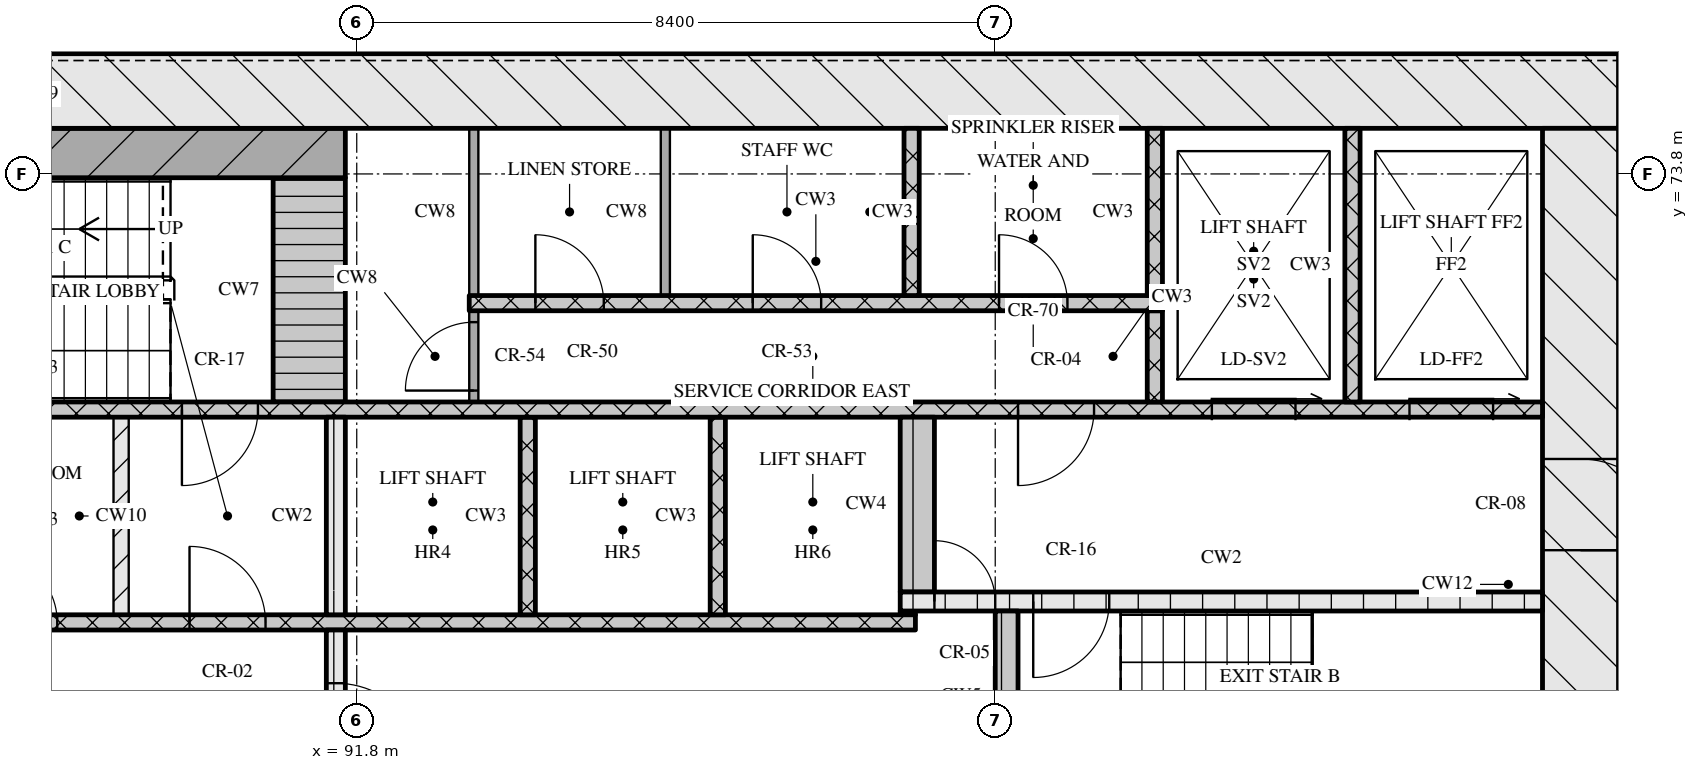
"""IFC4 building model, lengths in metres.
Left out: names, types, materials, properties, quantities, classifications, styles, units other than length and angle.
Written with IfcOpenShell. Run it as: python <this file> out.ifc"""

import sys

from ifc_helpers import new_model, si_unit, direction, frame, frame_2d, origin, place, context, subcontext, project, spatial, rectangle, extrude, element, fill, save


model = new_model("IFC4")
c1 = context("Model", 3, precision=1e-05, world=origin(), true_north=direction((0.0, 1.0)))
c2 = subcontext(c1, "Body", "Model", "MODEL_VIEW")
j1 = project(units=[si_unit("LENGTHUNIT", "METRE"), si_unit("PLANEANGLEUNIT", "RADIAN")], contexts=[c1])
p1 = place(None, origin())
s1 = spatial("IfcSite", under=j1, at=p1, CompositionType="ELEMENT")
p2 = place(p1, origin())
s2 = spatial("IfcBuilding", under=s1, at=p2, CompositionType="ELEMENT")
p3 = place(p2, frame((0.0, 0.0, 102.45)))
s3 = spatial("IfcBuildingStorey", under=s2, at=p3, CompositionType="ELEMENT", Elevation=102.45)
p4 = place(p3, frame((66.8, 74.9, 0.0), z_axis=(0.0, 0.0, 1.0), x_axis=(1.0, 0.0, 0.0)))
e1 = element("IfcWall", 1, at=p4, inside=s3, PredefinedType="SOLIDWALL", context=c2, shape_type="SweptSolid", body=[
    extrude(rectangle(XDim=41.6, YDim=1.0, at=frame_2d((20.8, 0.0))), origin(), (0.0, 0.0, 1.0), 3.32),
])
p5 = place(p3, frame((107.9, 62.4, 0.0), z_axis=(0.0, 0.0, 1.0), x_axis=(0.0, 1.0, 0.0)))
e2 = element("IfcWall", 2, at=p5, inside=s3, PredefinedType="SOLIDWALL", context=c2, shape_type="SweptSolid", body=[
    extrude(rectangle(XDim=12.0, YDim=1.0, at=frame_2d((6.0, 0.0))), origin(), (0.0, 0.0, 1.0), 3.32),
])
p6 = place(p5, frame((6.45, 0.0, 0.0)))
e3 = element("IfcOpeningElement", 3, at=p6, cuts=e2, PredefinedType="OPENING", context=c2, shape_type="SweptSolid", body=[
    extrude(rectangle(XDim=1.2, YDim=2.1, at=frame_2d((0.6, 1.05))), frame((0.0, 0.51, 0.0), z_axis=(0.0, -1.0, 0.0), x_axis=(1.0, 0.0, 0.0)), (0.0, 0.0, 1.0), 1.02),
])
p7 = place(p3, frame((91.525, 65.2, 0.0), z_axis=(0.0, 0.0, 1.0), x_axis=(0.0, 1.0, 0.0)))
e4 = element("IfcWall", 4, at=p7, inside=s3, PredefinedType="SOLIDWALL", context=c2, shape_type="SweptSolid", body=[
    extrude(rectangle(XDim=2.6, YDim=0.25, at=frame_2d((1.3, 0.0))), origin(), (0.0, 0.0, 1.0), 3.32),
])
p8 = place(p7, frame((0.7, 0.0, 0.0)))
e5 = element("IfcOpeningElement", 5, at=p8, cuts=e4, PredefinedType="OPENING", context=c2, shape_type="SweptSolid", body=[
    extrude(rectangle(XDim=1.2, YDim=2.1, at=frame_2d((0.6, 1.05))), frame((0.0, 0.135, 0.0), z_axis=(0.0, -1.0, 0.0), x_axis=(1.0, 0.0, 0.0)), (0.0, 0.0, 1.0), 0.27),
])
p9 = place(p3, frame((100.35, 65.2, 0.0), z_axis=(0.0, 0.0, 1.0), x_axis=(0.0, 1.0, 0.0)))
e6 = element("IfcWall", 6, at=p9, inside=s3, PredefinedType="SOLIDWALL", context=c2, shape_type="SweptSolid", body=[
    extrude(rectangle(XDim=2.85, YDim=0.3, at=frame_2d((1.425, 0.0))), origin(), (0.0, 0.0, 1.0), 3.32),
])
p10 = place(p3, frame((76.05, 67.9, 0.0), z_axis=(0.0, 0.0, 1.0), x_axis=(1.0, 0.0, 0.0)))
e7 = element("IfcWall", 7, at=p10, inside=s3, PredefinedType="SOLIDWALL", context=c2, shape_type="SweptSolid", body=[
    extrude(rectangle(XDim=23.1, YDim=0.2, at=frame_2d((11.55, 0.0))), origin(), (0.0, 0.0, 1.0), 3.32),
])
p11 = place(p10, frame((0.6, 0.0, 0.0)))
e8 = element("IfcOpeningElement", 8, at=p11, cuts=e7, PredefinedType="OPENING", context=c2, shape_type="SweptSolid", body=[
    extrude(rectangle(XDim=1.1, YDim=2.1, at=frame_2d((0.55, 1.05))), frame((0.0, 0.11, 0.0), z_axis=(0.0, -1.0, 0.0), x_axis=(1.0, 0.0, 0.0)), (0.0, 0.0, 1.0), 0.22),
])
p12 = place(p10, frame((3.1, 0.0, 0.0)))
e9 = element("IfcOpeningElement", 9, at=p12, cuts=e7, PredefinedType="OPENING", context=c2, shape_type="SweptSolid", body=[
    extrude(rectangle(XDim=1.1, YDim=2.1, at=frame_2d((0.55, 1.05))), frame((0.0, 0.11, 0.0), z_axis=(0.0, -1.0, 0.0), x_axis=(1.0, 0.0, 0.0)), (0.0, 0.0, 1.0), 0.22),
])
p13 = place(p10, frame((5.6, 0.0, 0.0)))
e10 = element("IfcOpeningElement", 10, at=p13, cuts=e7, PredefinedType="OPENING", context=c2, shape_type="SweptSolid", body=[
    extrude(rectangle(XDim=1.1, YDim=2.1, at=frame_2d((0.55, 1.05))), frame((0.0, 0.11, 0.0), z_axis=(0.0, -1.0, 0.0), x_axis=(1.0, 0.0, 0.0)), (0.0, 0.0, 1.0), 0.22),
])
p14 = place(p10, frame((8.45, 0.0, 0.0)))
e11 = element("IfcOpeningElement", 11, at=p14, cuts=e7, PredefinedType="OPENING", context=c2, shape_type="SweptSolid", body=[
    extrude(rectangle(XDim=0.9, YDim=2.1, at=frame_2d((0.45, 1.05))), frame((0.0, 0.11, 0.0), z_axis=(0.0, -1.0, 0.0), x_axis=(1.0, 0.0, 0.0)), (0.0, 0.0, 1.0), 0.22),
])
p15 = place(p10, frame((10.91, 0.0, 0.0)))
e12 = element("IfcOpeningElement", 12, at=p15, cuts=e7, PredefinedType="OPENING", context=c2, shape_type="SweptSolid", body=[
    extrude(rectangle(XDim=0.9, YDim=2.1, at=frame_2d((0.45, 1.05))), frame((0.0, 0.11, 0.0), z_axis=(0.0, -1.0, 0.0), x_axis=(1.0, 0.0, 0.0)), (0.0, 0.0, 1.0), 0.22),
])
p16 = place(p10, frame((13.55, 0.0, 0.0)))
e13 = element("IfcOpeningElement", 13, at=p16, cuts=e7, PredefinedType="OPENING", context=c2, shape_type="SweptSolid", body=[
    extrude(rectangle(XDim=1.0, YDim=2.1, at=frame_2d((0.5, 1.05))), frame((0.0, 0.11, 0.0), z_axis=(0.0, -1.0, 0.0), x_axis=(1.0, 0.0, 0.0)), (0.0, 0.0, 1.0), 0.22),
])
p17 = place(p3, frame((88.7, 68.0, 0.0), z_axis=(0.0, 0.0, 1.0), x_axis=(0.0, 1.0, 0.0)))
e14 = element("IfcWall", 14, at=p17, inside=s3, PredefinedType="PARTITIONING", context=c2, shape_type="SweptSolid", body=[
    extrude(rectangle(XDim=2.6, YDim=0.2, at=frame_2d((1.3, 0.0))), origin(), (0.0, 0.0, 1.0), 3.32),
])
p18 = place(p3, frame((91.525, 68.0, 0.0), z_axis=(0.0, 0.0, 1.0), x_axis=(0.0, 1.0, 0.0)))
e15 = element("IfcWall", 15, at=p18, inside=s3, PredefinedType="SOLIDWALL", context=c2, shape_type="SweptSolid", body=[
    extrude(rectangle(XDim=2.6, YDim=0.25, at=frame_2d((1.3, 0.0))), origin(), (0.0, 0.0, 1.0), 3.32),
])
for number, where, z_axis, x_axis in (
    (16, (94.05, 68.0, 0.0), (0.0, 0.0, 1.0), (0.0, 1.0, 0.0)),
    (17, (96.55, 68.0, 0.0), (0.0, 0.0, 1.0), (0.0, 1.0, 0.0)),
):
    element("IfcWall", number, at=place(p3, frame(where, z_axis=z_axis, x_axis=x_axis)), inside=s3, PredefinedType="SOLIDWALL", context=c2, shape_type="SweptSolid", body=[
        extrude(rectangle(XDim=2.6, YDim=0.2, at=frame_2d((1.3, 0.0))), origin(), (0.0, 0.0, 1.0), 3.32),
    ])
p19 = place(p3, frame((98.95, 68.025, 0.0), z_axis=(0.0, 0.0, 1.0), x_axis=(1.0, 0.0, 0.0)))
e18 = element("IfcWall", 18, at=p19, inside=s3, PredefinedType="SOLIDWALL", context=c2, shape_type="SweptSolid", body=[
    extrude(rectangle(XDim=0.2, YDim=0.05, at=frame_2d((0.1, 0.0))), origin(), (0.0, 0.0, 1.0), 3.32),
])
p20 = place(p3, frame((98.95, 68.175, 0.0), z_axis=(0.0, 0.0, 1.0), x_axis=(1.0, 0.0, 0.0)))
e19 = element("IfcWall", 19, at=p20, inside=s3, PredefinedType="SOLIDWALL", context=c2, shape_type="SweptSolid", body=[
    extrude(rectangle(XDim=8.45, YDim=0.25, at=frame_2d((4.225, 0.0))), origin(), (0.0, 0.0, 1.0), 3.32),
])
p21 = place(p20, frame((0.45, 0.0, 0.0)))
e20 = element("IfcOpeningElement", 20, at=p21, cuts=e19, PredefinedType="OPENING", context=c2, shape_type="SweptSolid", body=[
    extrude(rectangle(XDim=0.8, YDim=2.1, at=frame_2d((0.4, 1.05))), frame((0.0, 0.135, 0.0), z_axis=(0.0, -1.0, 0.0), x_axis=(1.0, 0.0, 0.0)), (0.0, 0.0, 1.0), 0.27),
])
p22 = place(p20, frame((1.75, 0.0, 0.0)))
e21 = element("IfcOpeningElement", 21, at=p22, cuts=e19, PredefinedType="OPENING", context=c2, shape_type="SweptSolid", body=[
    extrude(rectangle(XDim=1.0, YDim=2.1, at=frame_2d((0.5, 1.05))), frame((0.0, 0.135, 0.0), z_axis=(0.0, -1.0, 0.0), x_axis=(1.0, 0.0, 0.0)), (0.0, 0.0, 1.0), 0.27),
])
p23 = place(p3, frame((99.175, 68.3, 0.0), z_axis=(0.0, 0.0, 1.0), x_axis=(0.0, 1.0, 0.0)))
e22 = element("IfcWall", 22, at=p23, inside=s3, PredefinedType="SOLIDWALL", context=c2, shape_type="SweptSolid", body=[
    extrude(rectangle(XDim=2.3, YDim=0.45, at=frame_2d((1.15, 0.0))), origin(), (0.0, 0.0, 1.0), 3.32),
])
p24 = place(p3, frame((67.8, 70.7, 0.0), z_axis=(0.0, 0.0, 1.0), x_axis=(1.0, 0.0, 0.0)))
e23 = element("IfcWall", 23, at=p24, inside=s3, PredefinedType="SOLIDWALL", context=c2, shape_type="SweptSolid", body=[
    extrude(rectangle(XDim=39.6, YDim=0.2, at=frame_2d((19.8, 0.0))), origin(), (0.0, 0.0, 1.0), 3.32),
])
p25 = place(p24, frame((0.65, 0.0, 0.0)))
e24 = element("IfcOpeningElement", 24, at=p25, cuts=e23, PredefinedType="OPENING", context=c2, shape_type="SweptSolid", body=[
    extrude(rectangle(XDim=1.1, YDim=2.1, at=frame_2d((0.55, 1.05))), frame((0.0, 0.11, 0.0), z_axis=(0.0, -1.0, 0.0), x_axis=(1.0, 0.0, 0.0)), (0.0, 0.0, 1.0), 0.22),
])
p26 = place(p24, frame((3.25, 0.0, 0.0)))
e25 = element("IfcOpeningElement", 25, at=p26, cuts=e23, PredefinedType="OPENING", context=c2, shape_type="SweptSolid", body=[
    extrude(rectangle(XDim=1.1, YDim=2.1, at=frame_2d((0.55, 1.05))), frame((0.0, 0.11, 0.0), z_axis=(0.0, -1.0, 0.0), x_axis=(1.0, 0.0, 0.0)), (0.0, 0.0, 1.0), 0.22),
])
p27 = place(p24, frame((5.9, 0.0, 0.0)))
e26 = element("IfcOpeningElement", 26, at=p27, cuts=e23, PredefinedType="OPENING", context=c2, shape_type="SweptSolid", body=[
    extrude(rectangle(XDim=1.0, YDim=2.1, at=frame_2d((0.5, 1.05))), frame((0.0, 0.11, 0.0), z_axis=(0.0, -1.0, 0.0), x_axis=(1.0, 0.0, 0.0)), (0.0, 0.0, 1.0), 0.22),
])
p28 = place(p24, frame((21.7, 0.0, 0.0)))
e27 = element("IfcOpeningElement", 27, at=p28, cuts=e23, PredefinedType="OPENING", context=c2, shape_type="SweptSolid", body=[
    extrude(rectangle(XDim=1.0, YDim=2.1, at=frame_2d((0.5, 1.05))), frame((0.0, 0.11, 0.0), z_axis=(0.0, -1.0, 0.0), x_axis=(1.0, 0.0, 0.0)), (0.0, 0.0, 1.0), 0.22),
])
p29 = place(p24, frame((32.7, 0.0, 0.0)))
e28 = element("IfcOpeningElement", 28, at=p29, cuts=e23, PredefinedType="OPENING", context=c2, shape_type="SweptSolid", body=[
    extrude(rectangle(XDim=1.0, YDim=2.1, at=frame_2d((0.5, 1.05))), frame((0.0, 0.11, 0.0), z_axis=(0.0, -1.0, 0.0), x_axis=(1.0, 0.0, 0.0)), (0.0, 0.0, 1.0), 0.22),
])
p30 = place(p24, frame((35.25, 0.0, 0.0)))
e29 = element("IfcOpeningElement", 29, at=p30, cuts=e23, PredefinedType="OPENING", context=c2, shape_type="SweptSolid", body=[
    extrude(rectangle(XDim=1.1, YDim=2.1, at=frame_2d((0.55, 1.05))), frame((0.0, 0.11, 0.0), z_axis=(0.0, -1.0, 0.0), x_axis=(1.0, 0.0, 0.0)), (0.0, 0.0, 1.0), 0.22),
])
p31 = place(p24, frame((37.85, 0.0, 0.0)))
e30 = element("IfcOpeningElement", 30, at=p31, cuts=e23, PredefinedType="OPENING", context=c2, shape_type="SweptSolid", body=[
    extrude(rectangle(XDim=1.1, YDim=2.1, at=frame_2d((0.55, 1.05))), frame((0.0, 0.11, 0.0), z_axis=(0.0, -1.0, 0.0), x_axis=(1.0, 0.0, 0.0)), (0.0, 0.0, 1.0), 0.22),
])
p32 = place(p3, frame((91.175, 70.8, 0.0), z_axis=(0.0, 0.0, 1.0), x_axis=(0.0, 1.0, 0.0)))
e31 = element("IfcWall", 31, at=p32, inside=s3, PredefinedType="SOLIDWALL", context=c2, shape_type="SweptSolid", body=[
    extrude(rectangle(XDim=2.95, YDim=0.95, at=frame_2d((1.475, 0.0))), origin(), (0.0, 0.0, 1.0), 3.32),
])
p33 = place(p3, frame((93.34, 70.8, 0.0), z_axis=(0.0, 0.0, 1.0), x_axis=(0.0, 1.0, 0.0)))
e32 = element("IfcWall", 32, at=p33, inside=s3, PredefinedType="PARTITIONING", context=c2, shape_type="SweptSolid", body=[
    extrude(rectangle(XDim=1.2, YDim=0.12, at=frame_2d((0.6, 0.0))), origin(), (0.0, 0.0, 1.0), 3.32),
])
p34 = place(p33, frame((0.15, 0.0, 0.0)))
e33 = element("IfcOpeningElement", 33, at=p34, cuts=e32, PredefinedType="OPENING", context=c2, shape_type="SweptSolid", body=[
    extrude(rectangle(XDim=0.9, YDim=2.1, at=frame_2d((0.45, 1.05))), frame((0.0, 0.07, 0.0), z_axis=(0.0, -1.0, 0.0), x_axis=(1.0, 0.0, 0.0)), (0.0, 0.0, 1.0), 0.14),
])
p35 = place(p3, frame((102.3, 70.8, 0.0), z_axis=(0.0, 0.0, 1.0), x_axis=(0.0, 1.0, 0.0)))
e34 = element("IfcWall", 34, at=p35, inside=s3, PredefinedType="SOLIDWALL", context=c2, shape_type="SweptSolid", body=[
    extrude(rectangle(XDim=1.2, YDim=0.2, at=frame_2d((0.6, 0.0))), origin(), (0.0, 0.0, 1.0), 3.32),
])
p36 = place(p3, frame((104.9, 70.8, 0.0), z_axis=(0.0, 0.0, 1.0), x_axis=(0.0, 1.0, 0.0)))
e35 = element("IfcWall", 35, at=p36, inside=s3, PredefinedType="SOLIDWALL", context=c2, shape_type="SweptSolid", body=[
    extrude(rectangle(XDim=3.6, YDim=0.2, at=frame_2d((1.8, 0.0))), origin(), (0.0, 0.0, 1.0), 3.32),
])
p37 = place(p3, frame((93.28, 72.1, 0.0), z_axis=(0.0, 0.0, 1.0), x_axis=(1.0, 0.0, 0.0)))
e36 = element("IfcWall", 36, at=p37, inside=s3, PredefinedType="SOLIDWALL", context=c2, shape_type="SweptSolid", body=[
    extrude(rectangle(XDim=9.12, YDim=0.2, at=frame_2d((4.56, 0.0))), origin(), (0.0, 0.0, 1.0), 3.32),
])
p38 = place(p37, frame((0.87, 0.0, 0.0)))
e37 = element("IfcOpeningElement", 37, at=p38, cuts=e36, PredefinedType="OPENING", context=c2, shape_type="SweptSolid", body=[
    extrude(rectangle(XDim=0.9, YDim=2.1, at=frame_2d((0.45, 1.05))), frame((0.0, 0.11, 0.0), z_axis=(0.0, -1.0, 0.0), x_axis=(1.0, 0.0, 0.0)), (0.0, 0.0, 1.0), 0.22),
])
p39 = place(p37, frame((3.73, 0.0, 0.0)))
e38 = element("IfcOpeningElement", 38, at=p39, cuts=e36, PredefinedType="OPENING", context=c2, shape_type="SweptSolid", body=[
    extrude(rectangle(XDim=0.9, YDim=2.1, at=frame_2d((0.45, 1.05))), frame((0.0, 0.11, 0.0), z_axis=(0.0, -1.0, 0.0), x_axis=(1.0, 0.0, 0.0)), (0.0, 0.0, 1.0), 0.22),
])
p40 = place(p37, frame((6.97, 0.0, 0.0)))
e39 = element("IfcOpeningElement", 39, at=p40, cuts=e36, PredefinedType="OPENING", context=c2, shape_type="SweptSolid", body=[
    extrude(rectangle(XDim=0.9, YDim=2.1, at=frame_2d((0.45, 1.05))), frame((0.0, 0.11, 0.0), z_axis=(0.0, -1.0, 0.0), x_axis=(1.0, 0.0, 0.0)), (0.0, 0.0, 1.0), 0.22),
])
for number, where, z_axis, x_axis in (
    (40, (93.34, 72.2, 0.0), (0.0, 0.0, 1.0), (0.0, 1.0, 0.0)),
    (41, (95.86, 72.2, 0.0), (0.0, 0.0, 1.0), (0.0, 1.0, 0.0)),
):
    element("IfcWall", number, at=place(p3, frame(where, z_axis=z_axis, x_axis=x_axis)), inside=s3, PredefinedType="PARTITIONING", context=c2, shape_type="SweptSolid", body=[
        extrude(rectangle(XDim=2.2, YDim=0.12, at=frame_2d((1.1, 0.0))), origin(), (0.0, 0.0, 1.0), 3.32),
    ])
for number, where, z_axis, x_axis in (
    (42, (99.1, 72.2, 0.0), (0.0, 0.0, 1.0), (0.0, 1.0, 0.0)),
    (43, (102.3, 72.2, 0.0), (0.0, 0.0, 1.0), (0.0, 1.0, 0.0)),
):
    element("IfcWall", number, at=place(p3, frame(where, z_axis=z_axis, x_axis=x_axis)), inside=s3, PredefinedType="SOLIDWALL", context=c2, shape_type="SweptSolid", body=[
        extrude(rectangle(XDim=2.2, YDim=0.2, at=frame_2d((1.1, 0.0))), origin(), (0.0, 0.0, 1.0), 3.32),
    ])
p41 = place(p3, frame((83.55, 74.075, 0.0), z_axis=(0.0, 0.0, 1.0), x_axis=(1.0, 0.0, 0.0)))
e44 = element("IfcWall", 44, at=p41, inside=s3, PredefinedType="SOLIDWALL", context=c2, shape_type="SweptSolid", body=[
    extrude(rectangle(XDim=8.1, YDim=0.65, at=frame_2d((4.05, 0.0))), origin(), (0.0, 0.0, 1.0), 3.32),
])
p42 = place(p8, origin())
e45 = element("IfcDoor", 45, at=p42, inside=s3, OperationType="SINGLE_SWING_RIGHT", PredefinedType="DOOR", context=c2, shape_type="SweptSolid", body=[
    extrude(rectangle(XDim=1.2, YDim=2.1, at=frame_2d((0.6, 1.05))), frame((0.0, 0.025, 0.0), z_axis=(0.0, -1.0, 0.0), x_axis=(1.0, 0.0, 0.0)), (0.0, 0.0, 1.0), 0.05),
])
fill(e5, e45)
p43 = place(p15, origin())
e46 = element("IfcDoor", 46, at=p43, inside=s3, OperationType="SINGLE_SWING_LEFT", PredefinedType="DOOR", context=c2, shape_type="SweptSolid", body=[
    extrude(rectangle(XDim=0.9, YDim=2.1, at=frame_2d((0.45, 1.05))), frame((0.0, 0.025, 0.0), z_axis=(0.0, -1.0, 0.0), x_axis=(1.0, 0.0, 0.0)), (0.0, 0.0, 1.0), 0.05),
])
fill(e12, e46)
p44 = place(p16, origin())
e47 = element("IfcDoor", 47, at=p44, inside=s3, OperationType="SINGLE_SWING_LEFT", PredefinedType="DOOR", context=c2, shape_type="SweptSolid", body=[
    extrude(rectangle(XDim=1.0, YDim=2.1, at=frame_2d((0.5, 1.05))), frame((0.0, 0.025, 0.0), z_axis=(0.0, -1.0, 0.0), x_axis=(1.0, 0.0, 0.0)), (0.0, 0.0, 1.0), 0.05),
])
fill(e13, e47)
p45 = place(p21, origin())
e48 = element("IfcDoor", 48, at=p45, inside=s3, OperationType="SINGLE_SWING_LEFT", PredefinedType="DOOR", context=c2, shape_type="SweptSolid", body=[
    extrude(rectangle(XDim=0.8, YDim=2.1, at=frame_2d((0.4, 1.05))), frame((0.0, 0.025, 0.0), z_axis=(0.0, -1.0, 0.0), x_axis=(1.0, 0.0, 0.0)), (0.0, 0.0, 1.0), 0.05),
])
fill(e20, e48)
p46 = place(p22, origin())
e49 = element("IfcDoor", 49, at=p46, inside=s3, OperationType="SINGLE_SWING_RIGHT", PredefinedType="DOOR", context=c2, shape_type="SweptSolid", body=[
    extrude(rectangle(XDim=1.0, YDim=2.1, at=frame_2d((0.5, 1.05))), frame((0.0, 0.025, 0.0), z_axis=(0.0, -1.0, 0.0), x_axis=(1.0, 0.0, 0.0)), (0.0, 0.0, 1.0), 0.05),
])
fill(e21, e49)
p47 = place(p6, origin())
e50 = element("IfcDoor", 50, at=p47, inside=s3, OperationType="SINGLE_SWING_RIGHT", PredefinedType="DOOR", context=c2, shape_type="SweptSolid", body=[
    extrude(rectangle(XDim=1.2, YDim=2.1, at=frame_2d((0.6, 1.05))), frame((0.0, 0.025, 0.0), z_axis=(0.0, -1.0, 0.0), x_axis=(1.0, 0.0, 0.0)), (0.0, 0.0, 1.0), 0.05),
])
fill(e3, e50)
p48 = place(p28, origin())
e51 = element("IfcDoor", 51, at=p48, inside=s3, OperationType="SINGLE_SWING_RIGHT", PredefinedType="DOOR", context=c2, shape_type="SweptSolid", body=[
    extrude(rectangle(XDim=1.0, YDim=2.1, at=frame_2d((0.5, 1.05))), frame((0.0, 0.025, 0.0), z_axis=(0.0, -1.0, 0.0), x_axis=(1.0, 0.0, 0.0)), (0.0, 0.0, 1.0), 0.05),
])
fill(e27, e51)
p49 = place(p29, origin())
e52 = element("IfcDoor", 52, at=p49, inside=s3, OperationType="SINGLE_SWING_RIGHT", PredefinedType="DOOR", context=c2, shape_type="SweptSolid", body=[
    extrude(rectangle(XDim=1.0, YDim=2.1, at=frame_2d((0.5, 1.05))), frame((0.0, 0.025, 0.0), z_axis=(0.0, -1.0, 0.0), x_axis=(1.0, 0.0, 0.0)), (0.0, 0.0, 1.0), 0.05),
])
fill(e28, e52)
p50 = place(p30, origin())
e53 = element("IfcDoor", 53, at=p50, inside=s3, OperationType="SLIDING_TO_RIGHT", PredefinedType="DOOR", context=c2, shape_type="SweptSolid", body=[
    extrude(rectangle(XDim=1.1, YDim=2.1, at=frame_2d((0.55, 1.05))), frame((0.0, 0.025, 0.0), z_axis=(0.0, -1.0, 0.0), x_axis=(1.0, 0.0, 0.0)), (0.0, 0.0, 1.0), 0.05),
])
fill(e29, e53)
p51 = place(p31, origin())
e54 = element("IfcDoor", 54, at=p51, inside=s3, OperationType="SLIDING_TO_RIGHT", PredefinedType="DOOR", context=c2, shape_type="SweptSolid", body=[
    extrude(rectangle(XDim=1.1, YDim=2.1, at=frame_2d((0.55, 1.05))), frame((0.0, 0.025, 0.0), z_axis=(0.0, -1.0, 0.0), x_axis=(1.0, 0.0, 0.0)), (0.0, 0.0, 1.0), 0.05),
])
fill(e30, e54)
p52 = place(p34, origin())
e55 = element("IfcDoor", 55, at=p52, inside=s3, OperationType="SINGLE_SWING_LEFT", PredefinedType="DOOR", context=c2, shape_type="SweptSolid", body=[
    extrude(rectangle(XDim=0.9, YDim=2.1, at=frame_2d((0.45, 1.05))), frame((0.0, 0.025, 0.0), z_axis=(0.0, -1.0, 0.0), x_axis=(1.0, 0.0, 0.0)), (0.0, 0.0, 1.0), 0.05),
])
fill(e33, e55)
p53 = place(p38, origin())
e56 = element("IfcDoor", 56, at=p53, inside=s3, OperationType="SINGLE_SWING_LEFT", PredefinedType="DOOR", context=c2, shape_type="SweptSolid", body=[
    extrude(rectangle(XDim=0.9, YDim=2.1, at=frame_2d((0.45, 1.05))), frame((0.0, 0.025, 0.0), z_axis=(0.0, -1.0, 0.0), x_axis=(1.0, 0.0, 0.0)), (0.0, 0.0, 1.0), 0.05),
])
fill(e37, e56)
p54 = place(p39, origin())
e57 = element("IfcDoor", 57, at=p54, inside=s3, OperationType="SINGLE_SWING_LEFT", PredefinedType="DOOR", context=c2, shape_type="SweptSolid", body=[
    extrude(rectangle(XDim=0.9, YDim=2.1, at=frame_2d((0.45, 1.05))), frame((0.0, 0.025, 0.0), z_axis=(0.0, -1.0, 0.0), x_axis=(1.0, 0.0, 0.0)), (0.0, 0.0, 1.0), 0.05),
])
fill(e38, e57)
p55 = place(p40, origin())
e58 = element("IfcDoor", 58, at=p55, inside=s3, OperationType="SINGLE_SWING_LEFT", PredefinedType="DOOR", context=c2, shape_type="SweptSolid", body=[
    extrude(rectangle(XDim=0.9, YDim=2.1, at=frame_2d((0.45, 1.05))), frame((0.0, 0.025, 0.0), z_axis=(0.0, -1.0, 0.0), x_axis=(1.0, 0.0, 0.0)), (0.0, 0.0, 1.0), 0.05),
])
fill(e39, e58)
save(model, sys.argv[1])
